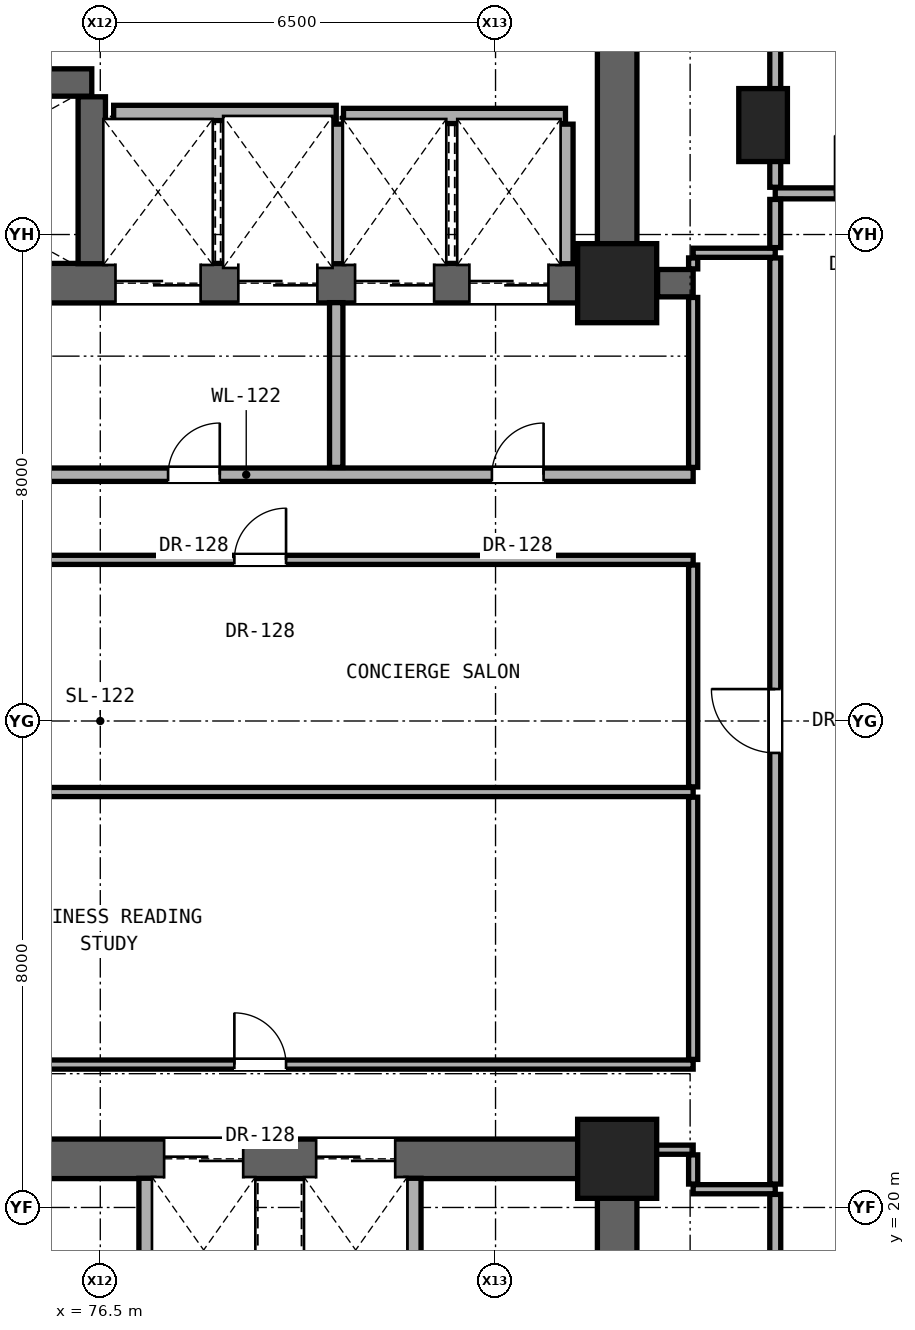
"""IFC4 building model, lengths in metres.
Left out: names, types, materials, properties, quantities, classifications, styles, units other than length and angle.
Written with IfcOpenShell. Run it as: python <this file> out.ifc"""

import sys

from ifc_helpers import new_model, si_unit, direction, frame, frame_2d, origin, origin_2d, place, context, subcontext, project, spatial, rectangle, extrude, element, fill, save


model = new_model("IFC4")
c1 = context("Model", 3, precision=1e-05, world=origin(), true_north=direction((0.0, 1.0)))
c2 = subcontext(c1, "Body", "Model", "MODEL_VIEW")
j1 = project(units=[si_unit("LENGTHUNIT", "METRE"), si_unit("PLANEANGLEUNIT", "RADIAN")], contexts=[c1])
p1 = place(None, origin())
s1 = spatial("IfcSite", under=j1, at=p1, CompositionType="ELEMENT")
p2 = place(p1, origin())
s2 = spatial("IfcBuilding", under=s1, at=p2, CompositionType="ELEMENT")
p3 = place(p2, frame((0.0, 0.0, 58.7)))
s3 = spatial("IfcBuildingStorey", under=s2, at=p3, CompositionType="ELEMENT", Elevation=58.7)
for number, where, z_axis, x_axis in (
    (1, (85.0, 20.8, 0.0), (0.0, 0.0, 1.0), (1.0, 0.0, 0.0)),
    (2, (85.0, 35.2, 0.0), (0.0, 0.0, 1.0), (1.0, 0.0, 0.0)),
):
    element("IfcColumn", number, at=place(p3, frame(where, z_axis=z_axis, x_axis=x_axis)), inside=s3, PredefinedType="COLUMN", context=c2, shape_type="SweptSolid", body=[
        extrude(rectangle(XDim=1.3, YDim=1.3, at=origin_2d()), origin(), (0.0, 0.0, 1.0), 3.3),
    ])
p4 = place(p3, frame((87.4, 37.8, 0.0), z_axis=(0.0, 0.0, 1.0), x_axis=(1.0, 0.0, 0.0)))
e3 = element("IfcColumn", 3, at=p4, inside=s3, PredefinedType="PILASTER", context=c2, shape_type="SweptSolid", body=[
    extrude(rectangle(XDim=0.8, YDim=1.2, at=origin_2d()), origin(), (0.0, 0.0, 1.0), 3.3),
])
p5 = place(p3, frame((85.0, 35.2, 0.0), z_axis=(0.0, 0.0, 1.0), x_axis=(0.0, 1.0, 0.0)))
e4 = element("IfcWall", 4, at=p5, inside=s3, PredefinedType="SHEAR", context=c2, shape_type="SweptSolid", body=[
    extrude(rectangle(XDim=5.6, YDim=0.65, at=frame_2d((2.8, 0.0))), origin(), (0.0, 0.0, 1.0), 3.06),
])
p6 = place(p3, frame((68.0, 35.2, 0.0), z_axis=(0.0, 0.0, 1.0), x_axis=(1.0, 0.0, 0.0)))
e5 = element("IfcWall", 5, at=p6, inside=s3, PredefinedType="SHEAR", context=c2, shape_type="SweptSolid", body=[
    extrude(rectangle(XDim=17.0, YDim=0.65, at=frame_2d((8.5, 0.0))), origin(), (0.0, 0.0, 1.0), 3.06),
])
p7 = place(p6, frame((1.06, 0.0, 0.0)))
e6 = element("IfcOpeningElement", 6, at=p7, cuts=e5, PredefinedType="OPENING", context=c2, shape_type="SweptSolid", body=[
    extrude(rectangle(XDim=1.15, YDim=2.2, at=frame_2d((0.575, 1.1))), frame((0.0, 0.335, 0.0), z_axis=(0.0, -1.0, 0.0), x_axis=(1.0, 0.0, 0.0)), (0.0, 0.0, 1.0), 0.67),
])
p8 = place(p6, frame((8.75, 0.0, 0.0)))
e7 = element("IfcOpeningElement", 7, at=p8, cuts=e5, PredefinedType="OPENING", context=c2, shape_type="SweptSolid", body=[
    extrude(rectangle(XDim=1.4, YDim=2.35, at=frame_2d((0.7, 1.175))), frame((0.0, 0.335, 0.0), z_axis=(0.0, -1.0, 0.0), x_axis=(1.0, 0.0, 0.0)), (0.0, 0.0, 1.0), 0.67),
])
p9 = place(p6, frame((10.77, 0.0, 0.0)))
e8 = element("IfcOpeningElement", 8, at=p9, cuts=e5, PredefinedType="OPENING", context=c2, shape_type="SweptSolid", body=[
    extrude(rectangle(XDim=1.3, YDim=2.3, at=frame_2d((0.65, 1.15))), frame((0.0, 0.335, 0.0), z_axis=(0.0, -1.0, 0.0), x_axis=(1.0, 0.0, 0.0)), (0.0, 0.0, 1.0), 0.67),
])
p10 = place(p6, frame((12.69, 0.0, 0.0)))
e9 = element("IfcOpeningElement", 9, at=p10, cuts=e5, PredefinedType="OPENING", context=c2, shape_type="SweptSolid", body=[
    extrude(rectangle(XDim=1.3, YDim=2.3, at=frame_2d((0.65, 1.15))), frame((0.0, 0.335, 0.0), z_axis=(0.0, -1.0, 0.0), x_axis=(1.0, 0.0, 0.0)), (0.0, 0.0, 1.0), 0.67),
])
p11 = place(p6, frame((14.57, 0.0, 0.0)))
e10 = element("IfcOpeningElement", 10, at=p11, cuts=e5, PredefinedType="OPENING", context=c2, shape_type="SweptSolid", body=[
    extrude(rectangle(XDim=1.3, YDim=2.3, at=frame_2d((0.65, 1.15))), frame((0.0, 0.335, 0.0), z_axis=(0.0, -1.0, 0.0), x_axis=(1.0, 0.0, 0.0)), (0.0, 0.0, 1.0), 0.67),
])
p12 = place(p3, frame((85.0, 15.2, 0.0), z_axis=(0.0, 0.0, 1.0), x_axis=(0.0, 1.0, 0.0)))
e11 = element("IfcWall", 11, at=p12, inside=s3, PredefinedType="SHEAR", context=c2, shape_type="SweptSolid", body=[
    extrude(rectangle(XDim=5.6, YDim=0.65, at=frame_2d((2.8, 0.0))), origin(), (0.0, 0.0, 1.0), 3.06),
])
p13 = place(p3, frame((68.0, 20.8, 0.0), z_axis=(0.0, 0.0, 1.0), x_axis=(1.0, 0.0, 0.0)))
e12 = element("IfcWall", 12, at=p13, inside=s3, PredefinedType="SHEAR", context=c2, shape_type="SweptSolid", body=[
    extrude(rectangle(XDim=17.0, YDim=0.65, at=frame_2d((8.5, 0.0))), origin(), (0.0, 0.0, 1.0), 3.06),
])
p14 = place(p13, frame((9.55, 0.0, 0.0)))
e13 = element("IfcOpeningElement", 13, at=p14, cuts=e12, PredefinedType="OPENING", context=c2, shape_type="SweptSolid", body=[
    extrude(rectangle(XDim=1.3, YDim=2.3, at=frame_2d((0.65, 1.15))), frame((0.0, 0.335, 0.0), z_axis=(0.0, -1.0, 0.0), x_axis=(1.0, 0.0, 0.0)), (0.0, 0.0, 1.0), 0.67),
])
p15 = place(p13, frame((12.05, 0.0, 0.0)))
e14 = element("IfcOpeningElement", 14, at=p15, cuts=e12, PredefinedType="OPENING", context=c2, shape_type="SweptSolid", body=[
    extrude(rectangle(XDim=1.3, YDim=2.3, at=frame_2d((0.65, 1.15))), frame((0.0, 0.335, 0.0), z_axis=(0.0, -1.0, 0.0), x_axis=(1.0, 0.0, 0.0)), (0.0, 0.0, 1.0), 0.67),
])
p16 = place(p3, frame((86.25, 20.3, 0.0), z_axis=(0.0, 0.0, 1.0), x_axis=(1.0, 0.0, 0.0)))
e15 = element("IfcWall", 15, at=p16, inside=s3, PredefinedType="PARTITIONING", context=c2, shape_type="SweptSolid", body=[
    extrude(rectangle(XDim=1.35, YDim=0.15, at=frame_2d((0.675, 0.0))), origin(), (0.0, 0.0, 1.0), 3.06),
])
p17 = place(p3, frame((85.32, 20.95, 0.0), z_axis=(0.0, 0.0, 1.0), x_axis=(1.0, 0.0, 0.0)))
e16 = element("IfcWall", 16, at=p17, inside=s3, PredefinedType="PARTITIONING", context=c2, shape_type="SweptSolid", body=[
    extrude(rectangle(XDim=0.93, YDim=0.15, at=frame_2d((0.465, 0.0))), origin(), (0.0, 0.0, 1.0), 2.452),
])
p18 = place(p3, frame((66.62, 22.35, 0.0), z_axis=(0.0, 0.0, 1.0), x_axis=(1.0, 0.0, 0.0)))
e17 = element("IfcWall", 17, at=p18, inside=s3, PredefinedType="PARTITIONING", context=c2, shape_type="SweptSolid", body=[
    extrude(rectangle(XDim=19.63, YDim=0.15, at=frame_2d((9.815, 0.0))), origin(), (0.0, 0.0, 1.0), 2.125),
])
p19 = place(p18, frame((12.085, 0.0, 0.0)))
e18 = element("IfcOpeningElement", 18, at=p19, cuts=e17, PredefinedType="OPENING", context=c2, shape_type="SweptSolid", body=[
    extrude(rectangle(XDim=0.85, YDim=2.01, at=frame_2d((0.425, 1.005))), frame((0.0, 0.085, 0.0), z_axis=(0.0, -1.0, 0.0), x_axis=(1.0, 0.0, 0.0)), (0.0, 0.0, 1.0), 0.17),
])
p20 = place(p3, frame((72.05, 26.832, 0.0), z_axis=(0.0, 0.0, 1.0), x_axis=(1.0, 0.0, 0.0)))
e19 = element("IfcWall", 19, at=p20, inside=s3, PredefinedType="PARTITIONING", context=c2, shape_type="SweptSolid", body=[
    extrude(rectangle(XDim=14.2, YDim=0.15, at=frame_2d((7.1, 0.0))), origin(), (0.0, 0.0, 1.0), 2.125),
])
p21 = place(p3, frame((66.62, 30.65, 0.0), z_axis=(0.0, 0.0, 1.0), x_axis=(1.0, 0.0, 0.0)))
e20 = element("IfcWall", 20, at=p21, inside=s3, PredefinedType="PARTITIONING", context=c2, shape_type="SweptSolid", body=[
    extrude(rectangle(XDim=19.63, YDim=0.15, at=frame_2d((9.815, 0.0))), origin(), (0.0, 0.0, 1.0), 2.125),
])
p22 = place(p21, frame((3.855, 0.0, 0.0)))
e21 = element("IfcOpeningElement", 21, at=p22, cuts=e20, PredefinedType="OPENING", context=c2, shape_type="SweptSolid", body=[
    extrude(rectangle(XDim=0.85, YDim=2.01, at=frame_2d((0.425, 1.005))), frame((0.0, 0.085, 0.0), z_axis=(0.0, -1.0, 0.0), x_axis=(1.0, 0.0, 0.0)), (0.0, 0.0, 1.0), 0.17),
])
p23 = place(p21, frame((12.085, 0.0, 0.0)))
e22 = element("IfcOpeningElement", 22, at=p23, cuts=e20, PredefinedType="OPENING", context=c2, shape_type="SweptSolid", body=[
    extrude(rectangle(XDim=0.85, YDim=2.01, at=frame_2d((0.425, 1.005))), frame((0.0, 0.085, 0.0), z_axis=(0.0, -1.0, 0.0), x_axis=(1.0, 0.0, 0.0)), (0.0, 0.0, 1.0), 0.17),
])
p24 = place(p3, frame((71.55, 32.05, 0.0), z_axis=(0.0, 0.0, 1.0), x_axis=(1.0, 0.0, 0.0)))
e23 = element("IfcWall", 23, at=p24, inside=s3, PredefinedType="SOLIDWALL", context=c2, shape_type="SweptSolid", body=[
    extrude(rectangle(XDim=14.7, YDim=0.22, at=frame_2d((7.35, 0.0))), origin(), (0.0, 0.0, 1.0), 2.125),
])
p25 = place(p24, frame((11.39, 0.0, 0.0)))
e24 = element("IfcOpeningElement", 24, at=p25, cuts=e23, PredefinedType="OPENING", context=c2, shape_type="SweptSolid", body=[
    extrude(rectangle(XDim=0.85, YDim=2.01, at=frame_2d((0.425, 1.005))), frame((0.0, 0.12, 0.0), z_axis=(0.0, -1.0, 0.0), x_axis=(1.0, 0.0, 0.0)), (0.0, 0.0, 1.0), 0.24),
])
p26 = place(p24, frame((6.065, 0.0, 0.0)))
e25 = element("IfcOpeningElement", 25, at=p26, cuts=e23, PredefinedType="OPENING", context=c2, shape_type="SweptSolid", body=[
    extrude(rectangle(XDim=0.85, YDim=2.01, at=frame_2d((0.425, 1.005))), frame((0.0, 0.12, 0.0), z_axis=(0.0, -1.0, 0.0), x_axis=(1.0, 0.0, 0.0)), (0.0, 0.0, 1.0), 0.24),
])
p27 = place(p24, frame((0.7, 0.0, 0.0)))
e26 = element("IfcOpeningElement", 26, at=p27, cuts=e23, PredefinedType="OPENING", context=c2, shape_type="SweptSolid", body=[
    extrude(rectangle(XDim=0.85, YDim=2.01, at=frame_2d((0.425, 1.005))), frame((0.0, 0.12, 0.0), z_axis=(0.0, -1.0, 0.0), x_axis=(1.0, 0.0, 0.0)), (0.0, 0.0, 1.0), 0.24),
])
p28 = place(p24, frame((2.55, 0.0, 0.0)))
e27 = element("IfcOpeningElement", 27, at=p28, cuts=e23, PredefinedType="OPENING", context=c2, shape_type="SweptSolid", body=[
    extrude(rectangle(XDim=0.85, YDim=2.01, at=frame_2d((0.425, 1.005))), frame((0.0, 0.12, 0.0), z_axis=(0.0, -1.0, 0.0), x_axis=(1.0, 0.0, 0.0)), (0.0, 0.0, 1.0), 0.24),
])
p29 = place(p3, frame((85.665, 35.2, 0.0), z_axis=(0.0, 0.0, 1.0), x_axis=(1.0, 0.0, 0.0)))
e28 = element("IfcWall", 28, at=p29, inside=s3, PredefinedType="SHEAR", context=c2, shape_type="SweptSolid", body=[
    extrude(rectangle(XDim=0.585, YDim=0.45, at=frame_2d((0.292, 0.0))), origin(), (0.0, 0.0, 1.0), 3.06),
])
p30 = place(p3, frame((86.25, 35.7, 0.0), z_axis=(0.0, 0.0, 1.0), x_axis=(1.0, 0.0, 0.0)))
e29 = element("IfcWall", 29, at=p30, inside=s3, PredefinedType="PARTITIONING", context=c2, shape_type="SweptSolid", body=[
    extrude(rectangle(XDim=1.35, YDim=0.15, at=frame_2d((0.675, 0.0))), origin(), (0.0, 0.0, 1.0), 3.06),
])
p31 = place(p3, frame((87.6, 36.677, 0.0), z_axis=(0.0, 0.0, 1.0), x_axis=(1.0, 0.0, 0.0)))
e30 = element("IfcWall", 30, at=p31, inside=s3, PredefinedType="PARTITIONING", context=c2, shape_type="SweptSolid", body=[
    extrude(rectangle(XDim=6.816, YDim=0.18, at=frame_2d((3.408, 0.0))), origin(), (0.0, 0.0, 1.0), 2.436),
])
p32 = place(p31, frame((0.983, 0.0, 0.0)))
e31 = element("IfcOpeningElement", 31, at=p32, cuts=e30, PredefinedType="OPENING", context=c2, shape_type="SweptSolid", body=[
    extrude(rectangle(XDim=0.95, YDim=2.15, at=frame_2d((0.475, 1.075))), frame((0.0, 0.1, 0.0), z_axis=(0.0, -1.0, 0.0), x_axis=(1.0, 0.0, 0.0)), (0.0, 0.0, 1.0), 0.2),
])
p33 = place(p31, frame((5.326, 0.0, 0.0)))
e32 = element("IfcOpeningElement", 32, at=p33, cuts=e30, PredefinedType="OPENING", context=c2, shape_type="SweptSolid", body=[
    extrude(rectangle(XDim=0.9, YDim=2.1, at=frame_2d((0.45, 1.05))), frame((0.0, 0.1, 0.0), z_axis=(0.0, -1.0, 0.0), x_axis=(1.0, 0.0, 0.0)), (0.0, 0.0, 1.0), 0.2),
])
p34 = place(p3, frame((80.5, 37.95, 0.0), z_axis=(0.0, 0.0, 1.0), x_axis=(1.0, 0.0, 0.0)))
e33 = element("IfcWall", 33, at=p34, inside=s3, PredefinedType="SOLIDWALL", context=c2, shape_type="SweptSolid", body=[
    extrude(rectangle(XDim=3.65, YDim=0.25, at=frame_2d((1.825, 0.0))), origin(), (0.0, 0.0, 1.0), 3.06),
])
p35 = place(p3, frame((76.72, 38.0, 0.0), z_axis=(0.0, 0.0, 1.0), x_axis=(1.0, 0.0, 0.0)))
e34 = element("IfcWall", 34, at=p35, inside=s3, PredefinedType="SOLIDWALL", context=c2, shape_type="SweptSolid", body=[
    extrude(rectangle(XDim=3.66, YDim=0.25, at=frame_2d((1.83, 0.0))), origin(), (0.0, 0.0, 1.0), 3.06),
])
p36 = place(p3, frame((68.32, 38.5, 0.0), z_axis=(0.0, 0.0, 1.0), x_axis=(1.0, 0.0, 0.0)))
e35 = element("IfcWall", 35, at=p36, inside=s3, PredefinedType="SHEAR", context=c2, shape_type="SweptSolid", body=[
    extrude(rectangle(XDim=8.04, YDim=0.45, at=frame_2d((4.02, 0.0))), origin(), (0.0, 0.0, 1.0), 3.06),
])
p37 = place(p3, frame((76.36, 35.52, 0.0), z_axis=(0.0, 0.0, 1.0), x_axis=(0.0, 1.0, 0.0)))
e36 = element("IfcWall", 36, at=p37, inside=s3, PredefinedType="SHEAR", context=c2, shape_type="SweptSolid", body=[
    extrude(rectangle(XDim=2.745, YDim=0.45, at=frame_2d((1.373, 0.0))), origin(), (0.0, 0.0, 1.0), 3.06),
])
p38 = place(p3, frame((77.26, 18.735, 0.0), z_axis=(0.0, 0.0, 1.0), x_axis=(0.0, 1.0, 0.0)))
e37 = element("IfcWall", 37, at=p38, inside=s3, PredefinedType="SOLIDWALL", context=c2, shape_type="SweptSolid", body=[
    extrude(rectangle(XDim=1.745, YDim=0.25, at=frame_2d((0.873, 0.0))), origin(), (0.0, 0.0, 1.0), 3.06),
])
p39 = place(p3, frame((80.38, 32.17, 0.0), z_axis=(0.0, 0.0, 1.0), x_axis=(0.0, 1.0, 0.0)))
e38 = element("IfcWall", 38, at=p39, inside=s3, PredefinedType="SOLIDWALL", context=c2, shape_type="SweptSolid", body=[
    extrude(rectangle(XDim=2.71, YDim=0.22, at=frame_2d((1.355, 0.0))), origin(), (0.0, 0.0, 1.0), 3.06),
])
for number, where, z_axis, x_axis in (
    (39, (80.38, 35.52, 0.0), (0.0, 0.0, 1.0), (0.0, 1.0, 0.0)),
    (40, (81.65, 18.185, 0.0), (0.0, 0.0, 1.0), (0.0, 1.0, 0.0)),
    (41, (84.15, 35.52, 0.0), (0.0, 0.0, 1.0), (0.0, 1.0, 0.0)),
):
    element("IfcWall", number, at=place(p3, frame(where, z_axis=z_axis, x_axis=x_axis)), inside=s3, PredefinedType="SOLIDWALL", context=c2, shape_type="SweptSolid", body=[
        extrude(rectangle(XDim=2.295, YDim=0.25, at=frame_2d((1.147, 0.0))), origin(), (0.0, 0.0, 1.0), 3.06),
    ])
p40 = place(p3, frame((86.25, 20.385, 0.0), z_axis=(0.0, 0.0, 1.0), x_axis=(0.0, 1.0, 0.0)))
e42 = element("IfcWall", 42, at=p40, inside=s3, PredefinedType="PARTITIONING", context=c2, shape_type="SweptSolid", body=[
    extrude(rectangle(XDim=0.48, YDim=0.15, at=frame_2d((0.24, 0.0))), origin(), (0.0, 0.0, 1.0), 2.452),
])
p41 = place(p3, frame((86.25, 22.435, 0.0), z_axis=(0.0, 0.0, 1.0), x_axis=(0.0, 1.0, 0.0)))
e43 = element("IfcWall", 43, at=p41, inside=s3, PredefinedType="PARTITIONING", context=c2, shape_type="SweptSolid", body=[
    extrude(rectangle(XDim=4.312, YDim=0.15, at=frame_2d((2.156, 0.0))), origin(), (0.0, 0.0, 1.0), 3.06),
])
p42 = place(p3, frame((86.25, 26.917, 0.0), z_axis=(0.0, 0.0, 1.0), x_axis=(0.0, 1.0, 0.0)))
e44 = element("IfcWall", 44, at=p42, inside=s3, PredefinedType="PARTITIONING", context=c2, shape_type="SweptSolid", body=[
    extrude(rectangle(XDim=3.648, YDim=0.15, at=frame_2d((1.824, 0.0))), origin(), (0.0, 0.0, 1.0), 2.279),
])
p43 = place(p3, frame((86.25, 32.17, 0.0), z_axis=(0.0, 0.0, 1.0), x_axis=(0.0, 1.0, 0.0)))
e45 = element("IfcWall", 45, at=p43, inside=s3, PredefinedType="PARTITIONING", context=c2, shape_type="SweptSolid", body=[
    extrude(rectangle(XDim=2.795, YDim=0.15, at=frame_2d((1.397, 0.0))), origin(), (0.0, 0.0, 1.0), 2.452),
])
p44 = place(p3, frame((86.25, 35.435, 0.0), z_axis=(0.0, 0.0, 1.0), x_axis=(0.0, 1.0, 0.0)))
e46 = element("IfcWall", 46, at=p44, inside=s3, PredefinedType="PARTITIONING", context=c2, shape_type="SweptSolid", body=[
    extrude(rectangle(XDim=0.18, YDim=0.15, at=frame_2d((0.09, 0.0))), origin(), (0.0, 0.0, 1.0), 2.452),
])
p45 = place(p3, frame((87.6, 16.703, 0.0), z_axis=(0.0, 0.0, 1.0), x_axis=(0.0, 1.0, 0.0)))
e47 = element("IfcWall", 47, at=p45, inside=s3, PredefinedType="PARTITIONING", context=c2, shape_type="SweptSolid", body=[
    extrude(rectangle(XDim=3.512, YDim=0.18, at=frame_2d((1.756, 0.0))), origin(), (0.0, 0.0, 1.0), 2.436),
])
p46 = place(p3, frame((87.6, 20.385, 0.0), z_axis=(0.0, 0.0, 1.0), x_axis=(0.0, 1.0, 0.0)))
e48 = element("IfcWall", 48, at=p46, inside=s3, PredefinedType="PARTITIONING", context=c2, shape_type="SweptSolid", body=[
    extrude(rectangle(XDim=15.23, YDim=0.18, at=frame_2d((7.615, 0.0))), origin(), (0.0, 0.0, 1.0), 2.279),
])
p47 = place(p46, frame((7.09, 0.0, 0.0)))
e49 = element("IfcOpeningElement", 49, at=p47, cuts=e48, PredefinedType="OPENING", context=c2, shape_type="SweptSolid", body=[
    extrude(rectangle(XDim=1.05, YDim=2.2, at=frame_2d((0.525, 1.1))), frame((0.0, 0.1, 0.0), z_axis=(0.0, -1.0, 0.0), x_axis=(1.0, 0.0, 0.0)), (0.0, 0.0, 1.0), 0.2),
])
p48 = place(p3, frame((87.6, 35.785, 0.0), z_axis=(0.0, 0.0, 1.0), x_axis=(0.0, 1.0, 0.0)))
e50 = element("IfcWall", 50, at=p48, inside=s3, PredefinedType="PARTITIONING", context=c2, shape_type="SweptSolid", body=[
    extrude(rectangle(XDim=0.792, YDim=0.18, at=frame_2d((0.396, 0.0))), origin(), (0.0, 0.0, 1.0), 3.06),
])
p49 = place(p3, frame((87.6, 36.777, 0.0), z_axis=(0.0, 0.0, 1.0), x_axis=(0.0, 1.0, 0.0)))
e51 = element("IfcWall", 51, at=p49, inside=s3, PredefinedType="PARTITIONING", context=c2, shape_type="SweptSolid", body=[
    extrude(rectangle(XDim=2.547, YDim=0.18, at=frame_2d((1.274, 0.0))), origin(), (0.0, 0.0, 1.0), 2.436),
])
p50 = place(p25, origin())
e52 = element("IfcDoor", 52, at=p50, inside=s3, OperationType="SINGLE_SWING_RIGHT", PredefinedType="DOOR", context=c2, shape_type="SweptSolid", body=[
    extrude(rectangle(XDim=0.85, YDim=2.01, at=frame_2d((0.425, 1.005))), frame((0.0, 0.025, 0.0), z_axis=(0.0, -1.0, 0.0), x_axis=(1.0, 0.0, 0.0)), (0.0, 0.0, 1.0), 0.05),
])
fill(e24, e52)
p51 = place(p26, origin())
e53 = element("IfcDoor", 53, at=p51, inside=s3, OperationType="SINGLE_SWING_RIGHT", PredefinedType="DOOR", context=c2, shape_type="SweptSolid", body=[
    extrude(rectangle(XDim=0.85, YDim=2.01, at=frame_2d((0.425, 1.005))), frame((0.0, 0.025, 0.0), z_axis=(0.0, -1.0, 0.0), x_axis=(1.0, 0.0, 0.0)), (0.0, 0.0, 1.0), 0.05),
])
fill(e25, e53)
p52 = place(p47, origin())
e54 = element("IfcDoor", 54, at=p52, inside=s3, OperationType="SINGLE_SWING_RIGHT", PredefinedType="DOOR", context=c2, shape_type="SweptSolid", body=[
    extrude(rectangle(XDim=1.05, YDim=2.2, at=frame_2d((0.525, 1.1))), frame((0.0, 0.025, 0.0), z_axis=(0.0, -1.0, 0.0), x_axis=(1.0, 0.0, 0.0)), (0.0, 0.0, 1.0), 0.05),
])
fill(e49, e54)
p53 = place(p32, origin())
e55 = element("IfcDoor", 55, at=p53, inside=s3, OperationType="SINGLE_SWING_LEFT", PredefinedType="DOOR", context=c2, shape_type="SweptSolid", body=[
    extrude(rectangle(XDim=0.95, YDim=2.15, at=frame_2d((0.475, 1.075))), frame((0.0, 0.025, 0.0), z_axis=(0.0, -1.0, 0.0), x_axis=(1.0, 0.0, 0.0)), (0.0, 0.0, 1.0), 0.05),
])
fill(e31, e55)
p54 = place(p19, origin())
e56 = element("IfcDoor", 56, at=p54, inside=s3, OperationType="SINGLE_SWING_LEFT", PredefinedType="DOOR", context=c2, shape_type="SweptSolid", body=[
    extrude(rectangle(XDim=0.85, YDim=2.01, at=frame_2d((0.425, 1.005))), frame((0.0, 0.025, 0.0), z_axis=(0.0, -1.0, 0.0), x_axis=(1.0, 0.0, 0.0)), (0.0, 0.0, 1.0), 0.05),
])
fill(e18, e56)
p55 = place(p23, origin())
e57 = element("IfcDoor", 57, at=p55, inside=s3, OperationType="SINGLE_SWING_RIGHT", PredefinedType="DOOR", context=c2, shape_type="SweptSolid", body=[
    extrude(rectangle(XDim=0.85, YDim=2.01, at=frame_2d((0.425, 1.005))), frame((0.0, 0.025, 0.0), z_axis=(0.0, -1.0, 0.0), x_axis=(1.0, 0.0, 0.0)), (0.0, 0.0, 1.0), 0.05),
])
fill(e22, e57)
p56 = place(p8, origin())
e58 = element("IfcDoor", 58, at=p56, inside=s3, OperationType="DOUBLE_DOOR_SLIDING", PredefinedType="DOOR", context=c2, shape_type="SweptSolid", body=[
    extrude(rectangle(XDim=1.4, YDim=2.35, at=frame_2d((0.7, 1.175))), frame((0.0, 0.025, 0.0), z_axis=(0.0, -1.0, 0.0), x_axis=(1.0, 0.0, 0.0)), (0.0, 0.0, 1.0), 0.05),
])
fill(e7, e58)
p57 = place(p9, origin())
e59 = element("IfcDoor", 59, at=p57, inside=s3, OperationType="DOUBLE_DOOR_SLIDING", PredefinedType="DOOR", context=c2, shape_type="SweptSolid", body=[
    extrude(rectangle(XDim=1.3, YDim=2.3, at=frame_2d((0.65, 1.15))), frame((0.0, 0.025, 0.0), z_axis=(0.0, -1.0, 0.0), x_axis=(1.0, 0.0, 0.0)), (0.0, 0.0, 1.0), 0.05),
])
fill(e8, e59)
p58 = place(p10, origin())
e60 = element("IfcDoor", 60, at=p58, inside=s3, OperationType="DOUBLE_DOOR_SLIDING", PredefinedType="DOOR", context=c2, shape_type="SweptSolid", body=[
    extrude(rectangle(XDim=1.3, YDim=2.3, at=frame_2d((0.65, 1.15))), frame((0.0, 0.025, 0.0), z_axis=(0.0, -1.0, 0.0), x_axis=(1.0, 0.0, 0.0)), (0.0, 0.0, 1.0), 0.05),
])
fill(e9, e60)
p59 = place(p11, origin())
e61 = element("IfcDoor", 61, at=p59, inside=s3, OperationType="DOUBLE_DOOR_SLIDING", PredefinedType="DOOR", context=c2, shape_type="SweptSolid", body=[
    extrude(rectangle(XDim=1.3, YDim=2.3, at=frame_2d((0.65, 1.15))), frame((0.0, 0.025, 0.0), z_axis=(0.0, -1.0, 0.0), x_axis=(1.0, 0.0, 0.0)), (0.0, 0.0, 1.0), 0.05),
])
fill(e10, e61)
p60 = place(p14, origin())
e62 = element("IfcDoor", 62, at=p60, inside=s3, OperationType="DOUBLE_DOOR_SLIDING", PredefinedType="DOOR", context=c2, shape_type="SweptSolid", body=[
    extrude(rectangle(XDim=1.3, YDim=2.3, at=frame_2d((0.65, 1.15))), frame((0.0, 0.025, 0.0), z_axis=(0.0, -1.0, 0.0), x_axis=(1.0, 0.0, 0.0)), (0.0, 0.0, 1.0), 0.05),
])
fill(e13, e62)
p61 = place(p15, origin())
e63 = element("IfcDoor", 63, at=p61, inside=s3, OperationType="DOUBLE_DOOR_SLIDING", PredefinedType="DOOR", context=c2, shape_type="SweptSolid", body=[
    extrude(rectangle(XDim=1.3, YDim=2.3, at=frame_2d((0.65, 1.15))), frame((0.0, 0.025, 0.0), z_axis=(0.0, -1.0, 0.0), x_axis=(1.0, 0.0, 0.0)), (0.0, 0.0, 1.0), 0.05),
])
fill(e14, e63)
save(model, sys.argv[1])
